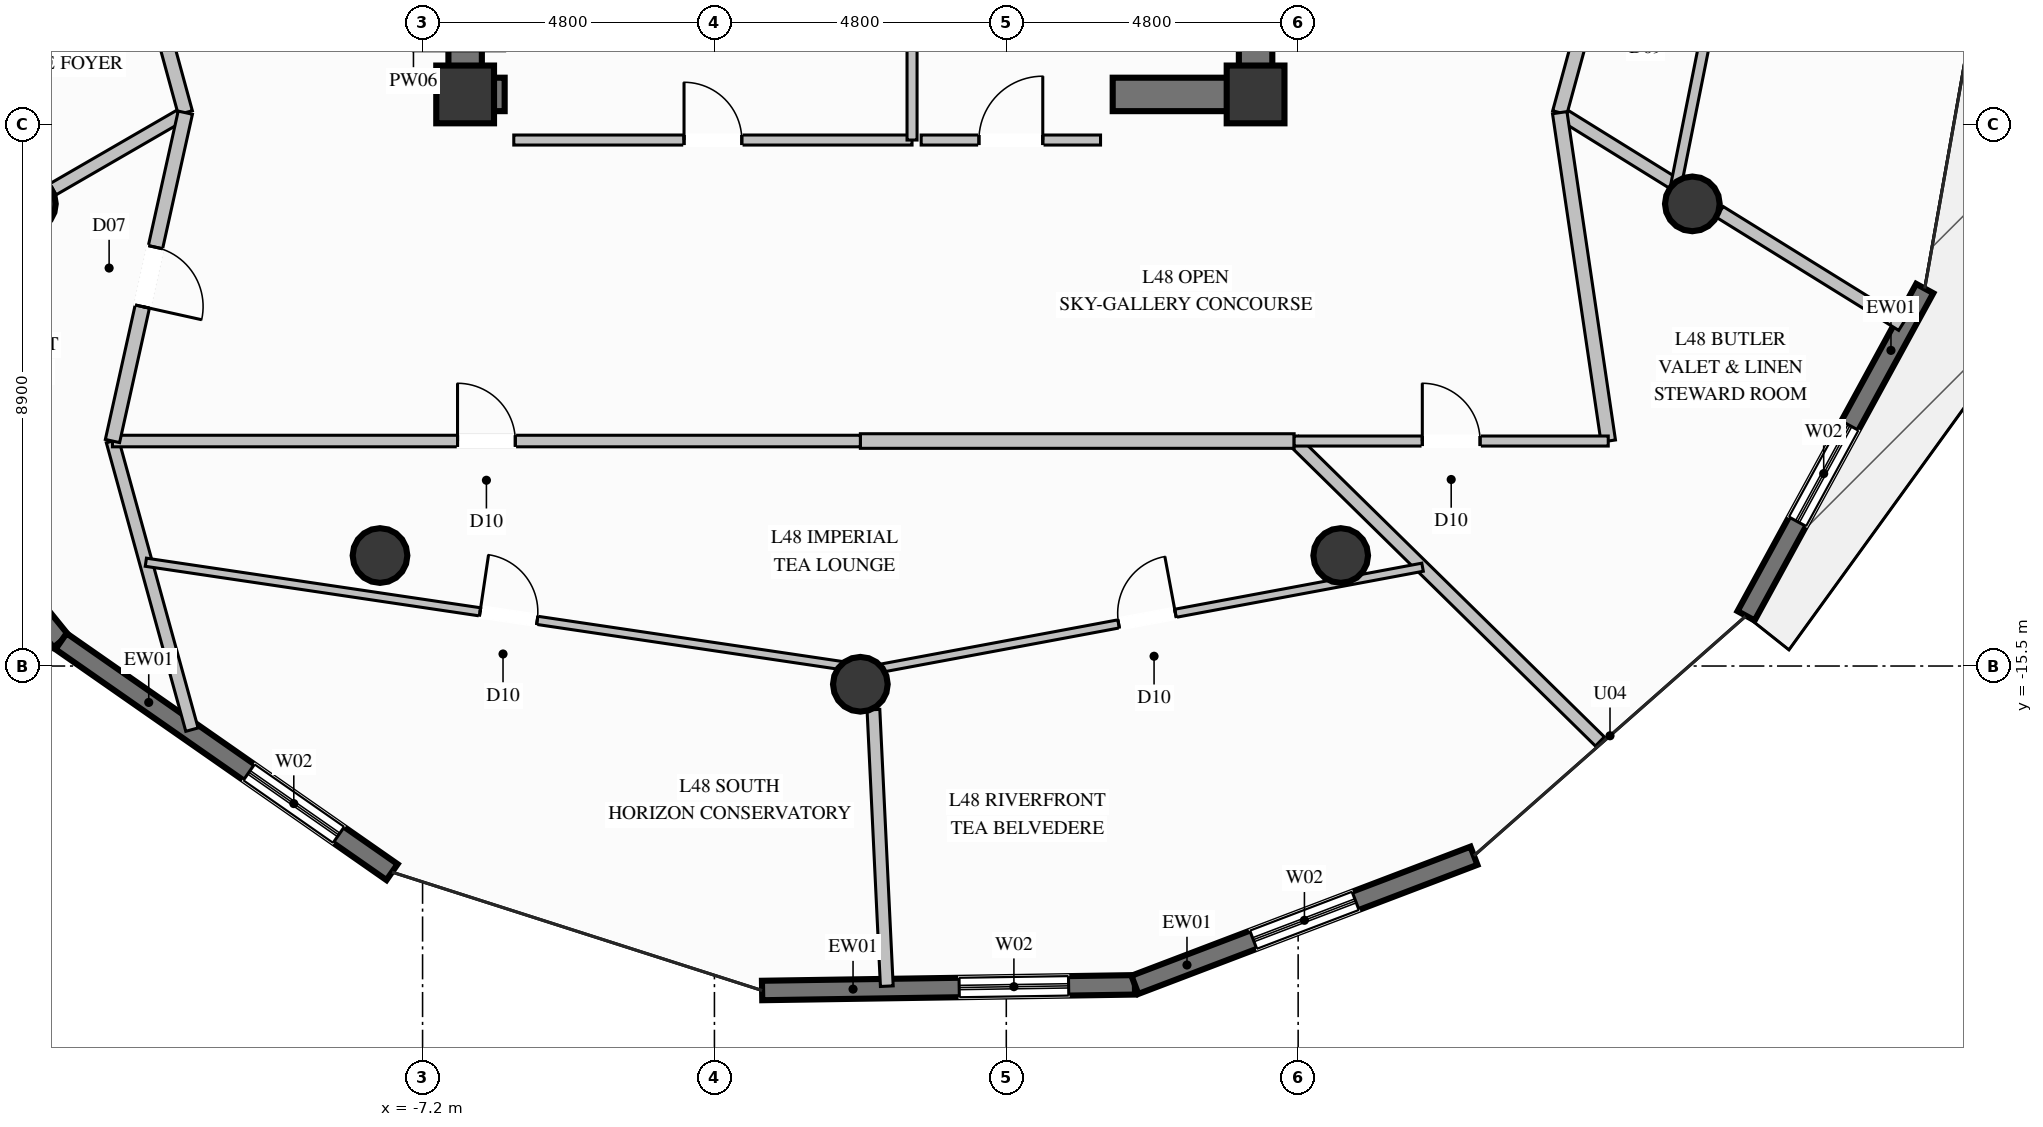
"""IFC4 building model, lengths in metres.
Left out: names, types, materials, properties, quantities, classifications, styles, units other than length and angle.
Written with IfcOpenShell. Run it as: python <this file> out.ifc"""

import sys

from ifc_helpers import new_model, si_unit, direction, frame, frame_2d, origin, origin_2d, place, context, subcontext, project, spatial, rectangle, circle, extrude, element, fill, save


model = new_model("IFC4")
c1 = context("Model", 3, precision=1e-05, world=origin(), true_north=direction((0.0, 1.0)))
c2 = subcontext(c1, "Body", "Model", "MODEL_VIEW")
j1 = project(units=[si_unit("LENGTHUNIT", "METRE"), si_unit("PLANEANGLEUNIT", "RADIAN")], contexts=[c1])
p1 = place(None, origin())
s1 = spatial("IfcSite", under=j1, at=p1, CompositionType="ELEMENT")
p2 = place(p1, origin())
s2 = spatial("IfcBuilding", under=s1, at=p2, CompositionType="ELEMENT")
p3 = place(p2, frame((0.0, 0.0, 187.6)))
s3 = spatial("IfcBuildingStorey", under=s2, at=p3, CompositionType="ELEMENT", Elevation=187.6)
for number, where, z_axis, x_axis in (
    (1, (-6.5, -6.1, 0.0), (0.0, 0.0, 1.0), (1.0, 0.0, 0.0)),
    (2, (6.5, -6.1, 0.0), (0.0, 0.0, 1.0), (1.0, 0.0, 0.0)),
):
    element("IfcColumn", number, at=place(p3, frame(where, z_axis=z_axis, x_axis=x_axis)), inside=s3, PredefinedType="COLUMN", context=c2, shape_type="SweptSolid", body=[
        extrude(rectangle(XDim=0.95, YDim=0.95, at=origin_2d()), origin(), (0.0, 0.0, 1.0), 3.6),
    ])
p4 = place(p3, frame((-6.225, -6.1, 0.0), z_axis=(0.0, 0.0, 1.0), x_axis=(1.0, 0.0, 0.0)))
e3 = element("IfcWall", 3, at=p4, inside=s3, PredefinedType="SHEAR", context=c2, shape_type="SweptSolid", body=[
    extrude(rectangle(XDim=0.375, YDim=0.55, at=frame_2d((0.188, 0.0))), origin(), (0.0, 0.0, 1.0), 3.6),
])
p5 = place(p3, frame((4.15, -6.1, 0.0), z_axis=(0.0, 0.0, 1.0), x_axis=(1.0, 0.0, 0.0)))
e4 = element("IfcWall", 4, at=p5, inside=s3, PredefinedType="SHEAR", context=c2, shape_type="SweptSolid", body=[
    extrude(rectangle(XDim=2.075, YDim=0.55, at=frame_2d((1.038, 0.0))), origin(), (0.0, 0.0, 1.0), 3.6),
])
p6 = place(p3, frame((-6.5, -6.375, 0.0), z_axis=(0.0, 0.0, 1.0), x_axis=(0.0, 1.0, 0.0)))
e5 = element("IfcWall", 5, at=p6, inside=s3, PredefinedType="SHEAR", context=c2, shape_type="SweptSolid", body=[
    extrude(rectangle(XDim=3.025, YDim=0.55, at=frame_2d((1.512, 0.0))), origin(), (0.0, 0.0, 1.0), 3.6),
])
p7 = place(p3, frame((6.5, -6.375, 0.0), z_axis=(0.0, 0.0, 1.0), x_axis=(0.0, 1.0, 0.0)))
e6 = element("IfcWall", 6, at=p7, inside=s3, PredefinedType="SHEAR", context=c2, shape_type="SweptSolid", body=[
    extrude(rectangle(XDim=4.025, YDim=0.55, at=frame_2d((2.012, 0.0))), origin(), (0.0, 0.0, 1.0), 3.6),
])
for number, where, z_axis, x_axis in (
    (7, (-13.683, -7.9, 0.0), (0.0, 0.0, 1.0), (1.0, 0.0, 0.0)),
    (8, (-7.9, -13.683, 0.0), (0.0, 0.0, 1.0), (1.0, 0.0, 0.0)),
    (9, (0.0, -15.8, 0.0), (0.0, 0.0, 1.0), (1.0, 0.0, 0.0)),
    (10, (7.9, -13.683, 0.0), (0.0, 0.0, 1.0), (1.0, 0.0, 0.0)),
    (11, (13.683, -7.9, 0.0), (0.0, 0.0, 1.0), (1.0, 0.0, 0.0)),
):
    element("IfcColumn", number, at=place(p3, frame(where, z_axis=z_axis, x_axis=x_axis)), inside=s3, PredefinedType="COLUMN", context=c2, shape_type="SweptSolid", body=[
        extrude(circle(Radius=0.45, at=origin_2d()), origin(), (0.0, 0.0, 1.0), 3.6),
    ])
p8 = place(p3, frame((17.505, -9.292, 0.0), z_axis=(0.0, 0.0, 1.0), x_axis=(-0.479142226632, -0.877737276557, 0.0)))
e12 = element("IfcWall", 12, at=p8, inside=s3, PredefinedType="SOLIDWALL", context=c2, shape_type="SweptSolid", body=[
    extrude(rectangle(XDim=6.132, YDim=0.32, at=frame_2d((3.066, 0.0))), origin(), (0.0, 0.0, 1.0), 3.36),
])
p9 = place(p8, frame((2.568, 0.0, 0.35)))
e13 = element("IfcOpeningElement", 13, at=p9, cuts=e12, PredefinedType="OPENING", context=c2, shape_type="SweptSolid", body=[
    extrude(rectangle(XDim=1.8, YDim=2.6, at=frame_2d((0.9, 1.3))), frame((0.0, 0.17, 0.0), z_axis=(0.0, -1.0, 0.0), x_axis=(1.0, 0.0, 0.0)), (0.0, 0.0, 1.0), 0.34),
])
p10 = place(p3, frame((-13.146, -15.093, 0.0), z_axis=(0.0, 0.0, 1.0), x_axis=(-0.629326572603, 0.777140955693, 0.0)))
e14 = element("IfcWall", 14, at=p10, inside=s3, PredefinedType="SOLIDWALL", context=c2, shape_type="SweptSolid", body=[
    extrude(rectangle(XDim=6.785, YDim=0.32, at=frame_2d((3.393, 0.0))), origin(), (0.0, 0.0, 1.0), 3.36),
])
p11 = place(p10, frame((2.487, 0.0, 0.85)))
e15 = element("IfcOpeningElement", 15, at=p11, cuts=e14, PredefinedType="OPENING", context=c2, shape_type="SweptSolid", body=[
    extrude(rectangle(XDim=1.5, YDim=1.2, at=frame_2d((0.75, 0.6))), frame((0.0, 0.17, 0.0), z_axis=(0.0, -1.0, 0.0), x_axis=(1.0, 0.0, 0.0)), (0.0, 0.0, 1.0), 0.34),
])
p12 = place(p3, frame((-7.702, -18.889, 0.0), z_axis=(0.0, 0.0, 1.0), x_axis=(-0.820289908615, 0.571947957269, 0.0)))
e16 = element("IfcWall", 16, at=p12, inside=s3, PredefinedType="SOLIDWALL", context=c2, shape_type="SweptSolid", body=[
    extrude(rectangle(XDim=6.637, YDim=0.32, at=frame_2d((3.318, 0.0))), origin(), (0.0, 0.0, 1.0), 3.36),
])
p13 = place(p12, frame((1.07, 0.0, 0.35)))
e17 = element("IfcOpeningElement", 17, at=p13, cuts=e16, PredefinedType="OPENING", context=c2, shape_type="SweptSolid", body=[
    extrude(rectangle(XDim=1.8, YDim=2.6, at=frame_2d((0.9, 1.3))), frame((0.0, 0.17, 0.0), z_axis=(0.0, -1.0, 0.0), x_axis=(1.0, 0.0, 0.0)), (0.0, 0.0, 1.0), 0.34),
])
p14 = place(p3, frame((4.515, -20.743, 0.0), z_axis=(0.0, 0.0, 1.0), x_axis=(-0.99988492463, -0.015170283382, 0.0)))
e18 = element("IfcWall", 18, at=p14, inside=s3, PredefinedType="SOLIDWALL", context=c2, shape_type="SweptSolid", body=[
    extrude(rectangle(XDim=6.132, YDim=0.32, at=frame_2d((3.066, 0.0))), origin(), (0.0, 0.0, 1.0), 3.36),
])
p15 = place(p14, frame((1.09, 0.0, 0.35)))
e19 = element("IfcOpeningElement", 19, at=p15, cuts=e18, PredefinedType="OPENING", context=c2, shape_type="SweptSolid", body=[
    extrude(rectangle(XDim=1.8, YDim=2.6, at=frame_2d((0.9, 1.3))), frame((0.0, 0.17, 0.0), z_axis=(0.0, -1.0, 0.0), x_axis=(1.0, 0.0, 0.0)), (0.0, 0.0, 1.0), 0.34),
])
p16 = place(p3, frame((10.091, -18.62, 0.0), z_axis=(0.0, 0.0, 1.0), x_axis=(-0.934568736607, -0.355782625429, 0.0)))
e20 = element("IfcWall", 20, at=p16, inside=s3, PredefinedType="SOLIDWALL", context=c2, shape_type="SweptSolid", body=[
    extrude(rectangle(XDim=5.967, YDim=0.32, at=frame_2d((2.983, 0.0))), origin(), (0.0, 0.0, 1.0), 3.36),
])
p17 = place(p16, frame((2.083, 0.0, 0.35)))
e21 = element("IfcOpeningElement", 21, at=p17, cuts=e20, PredefinedType="OPENING", context=c2, shape_type="SweptSolid", body=[
    extrude(rectangle(XDim=1.8, YDim=2.6, at=frame_2d((0.9, 1.3))), frame((0.0, 0.17, 0.0), z_axis=(0.0, -1.0, 0.0), x_axis=(1.0, 0.0, 0.0)), (0.0, 0.0, 1.0), 0.34),
])
p18 = place(p3, frame((-5.7, -6.85, 0.0), z_axis=(0.0, 0.0, 1.0), x_axis=(1.0, 0.0, 0.0)))
e22 = element("IfcWall", 22, at=p18, inside=s3, PredefinedType="PARTITIONING", context=c2, shape_type="SweptSolid", body=[
    extrude(rectangle(XDim=6.55, YDim=0.165, at=frame_2d((3.275, 0.0))), origin(), (0.0, 0.0, 1.0), 2.445),
])
p19 = place(p18, frame((2.8, 0.0, 0.0)))
e23 = element("IfcOpeningElement", 23, at=p19, cuts=e22, PredefinedType="OPENING", context=c2, shape_type="SweptSolid", body=[
    extrude(rectangle(XDim=0.95, YDim=2.1, at=frame_2d((0.475, 1.05))), frame((0.0, 0.093, 0.0), z_axis=(0.0, -1.0, 0.0), x_axis=(1.0, 0.0, 0.0)), (0.0, 0.0, 1.0), 0.185),
])
p20 = place(p3, frame((0.85, -6.85, 0.0), z_axis=(0.0, 0.0, 1.0), x_axis=(0.0, 1.0, 0.0)))
e24 = element("IfcWall", 24, at=p20, inside=s3, PredefinedType="PARTITIONING", context=c2, shape_type="SweptSolid", body=[
    extrude(rectangle(XDim=3.35, YDim=0.165, at=frame_2d((1.675, 0.0))), origin(), (0.0, 0.0, 1.0), 3.36),
])
p21 = place(p3, frame((1.0, -6.85, 0.0), z_axis=(0.0, 0.0, 1.0), x_axis=(1.0, 0.0, 0.0)))
e25 = element("IfcWall", 25, at=p21, inside=s3, PredefinedType="PARTITIONING", context=c2, shape_type="SweptSolid", body=[
    extrude(rectangle(XDim=2.95, YDim=0.165, at=frame_2d((1.475, 0.0))), origin(), (0.0, 0.0, 1.0), 2.445),
])
p22 = place(p21, frame((0.95, 0.0, 0.0)))
e26 = element("IfcOpeningElement", 26, at=p22, cuts=e25, PredefinedType="OPENING", context=c2, shape_type="SweptSolid", body=[
    extrude(rectangle(XDim=1.05, YDim=2.15, at=frame_2d((0.525, 1.075))), frame((0.0, 0.093, 0.0), z_axis=(0.0, -1.0, 0.0), x_axis=(1.0, 0.0, 0.0)), (0.0, 0.0, 1.0), 0.185),
])
p23 = place(p3, frame((-11.102, -6.4, 0.0), z_axis=(0.0, 0.0, 1.0), x_axis=(-0.8654883009, -0.500929137708, 0.0)))
e27 = element("IfcWall", 27, at=p23, inside=s3, PredefinedType="PARTITIONING", context=c2, shape_type="SweptSolid", body=[
    extrude(rectangle(XDim=2.515, YDim=0.21, at=frame_2d((1.258, 0.0))), origin(), (0.0, 0.0, 1.0), 2.801),
])
p24 = place(p3, frame((11.502, -6.4, 0.0), z_axis=(0.0, 0.0, 1.0), x_axis=(0.849789901528, -0.527121545054, 0.0)))
e28 = element("IfcWall", 28, at=p24, inside=s3, PredefinedType="PARTITIONING", context=c2, shape_type="SweptSolid", body=[
    extrude(rectangle(XDim=2.191, YDim=0.21, at=frame_2d((1.096, 0.0))), origin(), (0.0, 0.0, 1.0), 2.801),
])
p25 = place(p3, frame((14.134, -8.032, 0.0), z_axis=(0.0, 0.0, 1.0), x_axis=(0.849859297118, -0.527009653709, 0.0)))
e29 = element("IfcWall", 29, at=p25, inside=s3, PredefinedType="PARTITIONING", context=c2, shape_type="SweptSolid", body=[
    extrude(rectangle(XDim=3.528, YDim=0.21, at=frame_2d((1.764, 0.0))), origin(), (0.0, 0.0, 1.0), 3.36),
])
p26 = place(p3, frame((-12.85, 0.0, 0.0), z_axis=(0.0, 0.0, 1.0), x_axis=(0.263484816116, -0.96466354325, 0.0)))
e30 = element("IfcWall", 30, at=p26, inside=s3, PredefinedType="PARTITIONING", context=c2, shape_type="SweptSolid", body=[
    extrude(rectangle(XDim=6.634, YDim=0.24, at=frame_2d((3.317, 0.0))), origin(), (0.0, 0.0, 1.0), 3.36),
])
p27 = place(p3, frame((11.502, -6.4, 0.0), z_axis=(0.0, 0.0, 1.0), x_axis=(0.263465836707, 0.964668727019, 0.0)))
e31 = element("IfcWall", 31, at=p27, inside=s3, PredefinedType="PARTITIONING", context=c2, shape_type="SweptSolid", body=[
    extrude(rectangle(XDim=2.786, YDim=0.24, at=frame_2d((1.393, 0.0))), origin(), (0.0, 0.0, 1.0), 3.36),
])
p28 = place(p3, frame((13.416, -7.587, 0.0), z_axis=(0.0, 0.0, 1.0), x_axis=(0.19604388327, 0.980595123296, 0.0)))
e32 = element("IfcWall", 32, at=p28, inside=s3, PredefinedType="PLUMBINGWALL", context=c2, shape_type="SweptSolid", body=[
    extrude(rectangle(XDim=3.249, YDim=0.175, at=frame_2d((1.625, 0.0))), origin(), (0.0, 0.0, 1.0), 2.929),
])
p29 = place(p3, frame((7.134, -11.8, 0.0), z_axis=(0.0, 0.0, 1.0), x_axis=(0.713329749674, -0.700828558372, 0.0)))
e33 = element("IfcWall", 33, at=p29, inside=s3, PredefinedType="PARTITIONING", context=c2, shape_type="SweptSolid", body=[
    extrude(rectangle(XDim=7.05, YDim=0.21, at=frame_2d((3.525, 0.0))), origin(), (0.0, 0.0, 1.0), 3.36),
])
p30 = place(p3, frame((-12.3, -11.8, 0.0), z_axis=(0.0, 0.0, 1.0), x_axis=(0.265538015771, -0.964100390095, 0.0)))
e34 = element("IfcWall", 34, at=p30, inside=s3, PredefinedType="PARTITIONING", context=c2, shape_type="SweptSolid", body=[
    extrude(rectangle(XDim=4.923, YDim=0.21, at=frame_2d((2.461, 0.0))), origin(), (0.0, 0.0, 1.0), 3.36),
])
p31 = place(p3, frame((0.0, -11.8, 0.0), z_axis=(0.0, 0.0, 1.0), x_axis=(1.0, 0.0, 0.0)))
e35 = element("IfcWall", 35, at=p31, inside=s3, PredefinedType="PARTITIONING", context=c2, shape_type="SweptSolid", body=[
    extrude(rectangle(XDim=7.134, YDim=0.24, at=frame_2d((3.567, 0.0))), origin(), (0.0, 0.0, 1.0), 3.36),
])
p32 = place(p3, frame((-12.3, -11.8, 0.0), z_axis=(0.0, 0.0, 1.0), x_axis=(1.0, 0.0, 0.0)))
e36 = element("IfcWall", 36, at=p32, inside=s3, PredefinedType="PARTITIONING", context=c2, shape_type="SweptSolid", body=[
    extrude(rectangle(XDim=12.3, YDim=0.19, at=frame_2d((6.15, 0.0))), origin(), (0.0, 0.0, 1.0), 3.36),
])
p33 = place(p32, frame((5.675, 0.0, 0.0)))
e37 = element("IfcOpeningElement", 37, at=p33, cuts=e36, PredefinedType="OPENING", context=c2, shape_type="SweptSolid", body=[
    extrude(rectangle(XDim=0.95, YDim=2.1, at=frame_2d((0.475, 1.05))), frame((0.0, 0.105, 0.0), z_axis=(0.0, -1.0, 0.0), x_axis=(1.0, 0.0, 0.0)), (0.0, 0.0, 1.0), 0.21),
])
p34 = place(p3, frame((-11.102, -6.4, 0.0), z_axis=(0.0, 0.0, 1.0), x_axis=(-0.216579944639, -0.976264885971, 0.0)))
e38 = element("IfcWall", 38, at=p34, inside=s3, PredefinedType="PARTITIONING", context=c2, shape_type="SweptSolid", body=[
    extrude(rectangle(XDim=5.531, YDim=0.24, at=frame_2d((2.766, 0.0))), origin(), (0.0, 0.0, 1.0), 3.36),
])
p35 = place(p34, frame((2.266, 0.0, 0.0)))
e39 = element("IfcOpeningElement", 39, at=p35, cuts=e38, PredefinedType="OPENING", context=c2, shape_type="SweptSolid", body=[
    extrude(rectangle(XDim=1.0, YDim=2.2, at=frame_2d((0.5, 1.1))), frame((0.0, 0.13, 0.0), z_axis=(0.0, -1.0, 0.0), x_axis=(1.0, 0.0, 0.0)), (0.0, 0.0, 1.0), 0.26),
])
p36 = place(p3, frame((0.215, -16.218, 0.0), z_axis=(0.0, 0.0, 1.0), x_axis=(0.048321921396, -0.998831813627, 0.0)))
e40 = element("IfcWall", 40, at=p36, inside=s3, PredefinedType="PARTITIONING", context=c2, shape_type="SweptSolid", body=[
    extrude(rectangle(XDim=4.552, YDim=0.21, at=frame_2d((2.276, 0.0))), origin(), (0.0, 0.0, 1.0), 3.36),
])
p37 = place(p3, frame((-11.751, -13.793, 0.0), z_axis=(0.0, 0.0, 1.0), x_axis=(0.989155822626, -0.146869869494, 0.0)))
e41 = element("IfcWall", 41, at=p37, inside=s3, PredefinedType="PARTITIONING", context=c2, shape_type="SweptSolid", body=[
    extrude(rectangle(XDim=12.065, YDim=0.135, at=frame_2d((6.032, 0.0))), origin(), (0.0, 0.0, 1.0), 2.929),
])
p38 = place(p37, frame((5.557, 0.0, 0.0)))
e42 = element("IfcOpeningElement", 42, at=p38, cuts=e41, PredefinedType="OPENING", context=c2, shape_type="SweptSolid", body=[
    extrude(rectangle(XDim=0.95, YDim=2.1, at=frame_2d((0.475, 1.05))), frame((0.0, 0.078, 0.0), z_axis=(0.0, -1.0, 0.0), x_axis=(1.0, 0.0, 0.0)), (0.0, 0.0, 1.0), 0.155),
])
p39 = place(p3, frame((0.183, -15.565, 0.0), z_axis=(0.0, 0.0, 1.0), x_axis=(0.983055769837, 0.183306719434, 0.0)))
e43 = element("IfcWall", 43, at=p39, inside=s3, PredefinedType="PARTITIONING", context=c2, shape_type="SweptSolid", body=[
    extrude(rectangle(XDim=9.219, YDim=0.135, at=frame_2d((4.61, 0.0))), origin(), (0.0, 0.0, 1.0), 2.929),
])
p40 = place(p39, frame((4.135, 0.0, 0.0)))
e44 = element("IfcOpeningElement", 44, at=p40, cuts=e43, PredefinedType="OPENING", context=c2, shape_type="SweptSolid", body=[
    extrude(rectangle(XDim=0.95, YDim=2.1, at=frame_2d((0.475, 1.05))), frame((0.0, 0.078, 0.0), z_axis=(0.0, -1.0, 0.0), x_axis=(1.0, 0.0, 0.0)), (0.0, 0.0, 1.0), 0.155),
])
p41 = place(p3, frame((12.3, -11.8, 0.0), z_axis=(0.0, 0.0, 1.0), x_axis=(-0.146203405363, 0.98925454978, 0.0)))
e45 = element("IfcWall", 45, at=p41, inside=s3, PredefinedType="PARTITIONING", context=c2, shape_type="SweptSolid", body=[
    extrude(rectangle(XDim=5.459, YDim=0.24, at=frame_2d((2.729, 0.0))), origin(), (0.0, 0.0, 1.0), 3.36),
])
p42 = place(p3, frame((7.134, -11.8, 0.0), z_axis=(0.0, 0.0, 1.0), x_axis=(1.0, 0.0, 0.0)))
e46 = element("IfcWall", 46, at=p42, inside=s3, PredefinedType="PARTITIONING", context=c2, shape_type="SweptSolid", body=[
    extrude(rectangle(XDim=5.166, YDim=0.165, at=frame_2d((2.583, 0.0))), origin(), (0.0, 0.0, 1.0), 3.36),
])
p43 = place(p42, frame((2.108, 0.0, 0.0)))
e47 = element("IfcOpeningElement", 47, at=p43, cuts=e46, PredefinedType="OPENING", context=c2, shape_type="SweptSolid", body=[
    extrude(rectangle(XDim=0.95, YDim=2.1, at=frame_2d((0.475, 1.05))), frame((0.0, 0.093, 0.0), z_axis=(0.0, -1.0, 0.0), x_axis=(1.0, 0.0, 0.0)), (0.0, 0.0, 1.0), 0.185),
])
p44 = place(p9, origin())
e48 = element("IfcWindow", 48, at=p44, inside=s3, PartitioningType="SINGLE_PANEL", PredefinedType="WINDOW", context=c2, shape_type="SweptSolid", body=[
    extrude(rectangle(XDim=1.8, YDim=2.6, at=frame_2d((0.9, 1.3))), frame((0.0, 0.03, 0.0), z_axis=(0.0, -1.0, 0.0), x_axis=(1.0, 0.0, 0.0)), (0.0, 0.0, 1.0), 0.06),
])
fill(e13, e48)
p45 = place(p13, origin())
e49 = element("IfcWindow", 49, at=p45, inside=s3, PartitioningType="SINGLE_PANEL", PredefinedType="WINDOW", context=c2, shape_type="SweptSolid", body=[
    extrude(rectangle(XDim=1.8, YDim=2.6, at=frame_2d((0.9, 1.3))), frame((0.0, 0.03, 0.0), z_axis=(0.0, -1.0, 0.0), x_axis=(1.0, 0.0, 0.0)), (0.0, 0.0, 1.0), 0.06),
])
fill(e17, e49)
p46 = place(p15, origin())
e50 = element("IfcWindow", 50, at=p46, inside=s3, PartitioningType="SINGLE_PANEL", PredefinedType="WINDOW", context=c2, shape_type="SweptSolid", body=[
    extrude(rectangle(XDim=1.8, YDim=2.6, at=frame_2d((0.9, 1.3))), frame((0.0, 0.03, 0.0), z_axis=(0.0, -1.0, 0.0), x_axis=(1.0, 0.0, 0.0)), (0.0, 0.0, 1.0), 0.06),
])
fill(e19, e50)
p47 = place(p17, origin())
e51 = element("IfcWindow", 51, at=p47, inside=s3, PartitioningType="SINGLE_PANEL", PredefinedType="WINDOW", context=c2, shape_type="SweptSolid", body=[
    extrude(rectangle(XDim=1.8, YDim=2.6, at=frame_2d((0.9, 1.3))), frame((0.0, 0.03, 0.0), z_axis=(0.0, -1.0, 0.0), x_axis=(1.0, 0.0, 0.0)), (0.0, 0.0, 1.0), 0.06),
])
fill(e21, e51)
p48 = place(p19, origin())
e52 = element("IfcDoor", 52, at=p48, inside=s3, OperationType="SINGLE_SWING_LEFT", PredefinedType="DOOR", context=c2, shape_type="SweptSolid", body=[
    extrude(rectangle(XDim=0.95, YDim=2.1, at=frame_2d((0.475, 1.05))), frame((0.0, 0.025, 0.0), z_axis=(0.0, -1.0, 0.0), x_axis=(1.0, 0.0, 0.0)), (0.0, 0.0, 1.0), 0.05),
])
fill(e23, e52)
p49 = place(p22, origin())
e53 = element("IfcDoor", 53, at=p49, inside=s3, OperationType="SINGLE_SWING_RIGHT", PredefinedType="DOOR", context=c2, shape_type="SweptSolid", body=[
    extrude(rectangle(XDim=1.05, YDim=2.15, at=frame_2d((0.525, 1.075))), frame((0.0, 0.025, 0.0), z_axis=(0.0, -1.0, 0.0), x_axis=(1.0, 0.0, 0.0)), (0.0, 0.0, 1.0), 0.05),
])
fill(e26, e53)
p50 = place(p33, origin())
e54 = element("IfcDoor", 54, at=p50, inside=s3, OperationType="SINGLE_SWING_LEFT", PredefinedType="DOOR", context=c2, shape_type="SweptSolid", body=[
    extrude(rectangle(XDim=0.95, YDim=2.1, at=frame_2d((0.475, 1.05))), frame((0.0, 0.025, 0.0), z_axis=(0.0, -1.0, 0.0), x_axis=(1.0, 0.0, 0.0)), (0.0, 0.0, 1.0), 0.05),
])
fill(e37, e54)
p51 = place(p35, origin())
e55 = element("IfcDoor", 55, at=p51, inside=s3, OperationType="SINGLE_SWING_RIGHT", PredefinedType="DOOR", context=c2, shape_type="SweptSolid", body=[
    extrude(rectangle(XDim=1.0, YDim=2.2, at=frame_2d((0.5, 1.1))), frame((0.0, 0.025, 0.0), z_axis=(0.0, -1.0, 0.0), x_axis=(1.0, 0.0, 0.0)), (0.0, 0.0, 1.0), 0.05),
])
fill(e39, e55)
p52 = place(p38, origin())
e56 = element("IfcDoor", 56, at=p52, inside=s3, OperationType="SINGLE_SWING_LEFT", PredefinedType="DOOR", context=c2, shape_type="SweptSolid", body=[
    extrude(rectangle(XDim=0.95, YDim=2.1, at=frame_2d((0.475, 1.05))), frame((0.0, 0.025, 0.0), z_axis=(0.0, -1.0, 0.0), x_axis=(1.0, 0.0, 0.0)), (0.0, 0.0, 1.0), 0.05),
])
fill(e42, e56)
p53 = place(p40, origin())
e57 = element("IfcDoor", 57, at=p53, inside=s3, OperationType="SINGLE_SWING_RIGHT", PredefinedType="DOOR", context=c2, shape_type="SweptSolid", body=[
    extrude(rectangle(XDim=0.95, YDim=2.1, at=frame_2d((0.475, 1.05))), frame((0.0, 0.025, 0.0), z_axis=(0.0, -1.0, 0.0), x_axis=(1.0, 0.0, 0.0)), (0.0, 0.0, 1.0), 0.05),
])
fill(e44, e57)
p54 = place(p43, origin())
e58 = element("IfcDoor", 58, at=p54, inside=s3, OperationType="SINGLE_SWING_LEFT", PredefinedType="DOOR", context=c2, shape_type="SweptSolid", body=[
    extrude(rectangle(XDim=0.95, YDim=2.1, at=frame_2d((0.475, 1.05))), frame((0.0, 0.025, 0.0), z_axis=(0.0, -1.0, 0.0), x_axis=(1.0, 0.0, 0.0)), (0.0, 0.0, 1.0), 0.05),
])
fill(e47, e58)
save(model, sys.argv[1])
